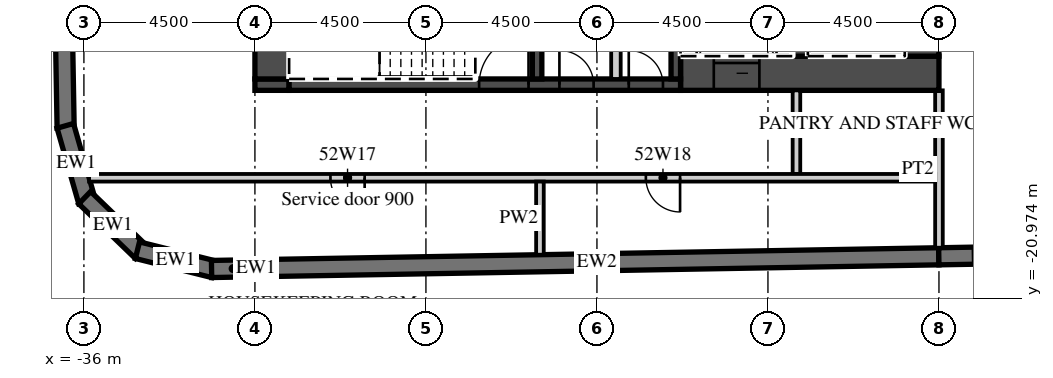
"""IFC4 building model, lengths in metres.
Left out: names, types, materials, properties, quantities, classifications, styles, units other than length and angle.
Written with IfcOpenShell. Run it as: python <this file> out.ifc"""

import sys

from ifc_helpers import new_model, si_unit, direction, frame, frame_2d, origin, place, context, subcontext, project, spatial, polyline, rectangle, outline, extrude, element, fill, save


model = new_model("IFC4")
c1 = context("Model", 3, precision=1e-05, world=origin(), true_north=direction((0.0, 1.0)))
c2 = subcontext(c1, "Body", "Model", "MODEL_VIEW")
j1 = project(units=[si_unit("LENGTHUNIT", "METRE"), si_unit("PLANEANGLEUNIT", "RADIAN")], contexts=[c1])
p1 = place(None, origin())
s1 = spatial("IfcSite", under=j1, at=p1, CompositionType="ELEMENT")
p2 = place(p1, origin())
s2 = spatial("IfcBuilding", under=s1, at=p2, CompositionType="ELEMENT")
p3 = place(p2, frame((0.0, 0.0, 217.7)))
s3 = spatial("IfcBuildingStorey", under=s2, at=p3, CompositionType="ELEMENT", Elevation=217.7)
p4 = place(p3, frame((-37.057, 16.503, 0.0), z_axis=(0.0, 0.0, 1.0), x_axis=(0.017452279857, -0.999847697366, 0.0)))
e1 = element("IfcWall", 1, at=p4, inside=s3, PredefinedType="SOLIDWALL", context=c2, shape_type="SweptSolid", body=[
    extrude(rectangle(XDim=33.0, YDim=0.45, at=frame_2d((16.5, 0.0))), origin(), (0.0, 0.0, 1.0), 3.02),
])
p5 = place(p3, frame((-36.49, -16.434, 0.0), z_axis=(0.0, 0.0, 1.0), x_axis=(0.275577603096, -0.961278827745, 0.0)))
e2 = element("IfcWall", 2, at=p5, inside=s3, PredefinedType="SOLIDWALL", context=c2, shape_type="SweptSolid", body=[
    extrude(outline(polyline([(0.0, -0.225), (2.071, -0.225), (1.95, 0.225), (0.121, 0.225), (0.0, -0.225)])), origin(), (0.0, 0.0, 1.0), 3.02),
])
p6 = place(p3, frame((-35.979, -18.324, 0.0), z_axis=(0.0, 0.0, 1.0), x_axis=(0.719320193998, -0.694678672846, 0.0)))
e3 = element("IfcWall", 3, at=p6, inside=s3, PredefinedType="SOLIDWALL", context=c2, shape_type="SweptSolid", body=[
    extrude(outline(polyline([(0.0, -0.225), (2.071, -0.225), (1.95, 0.225), (0.121, 0.225), (0.0, -0.225)])), origin(), (0.0, 0.0, 1.0), 3.02),
])
p7 = place(p3, frame((-34.591, -19.706, 0.0), z_axis=(0.0, 0.0, 1.0), x_axis=(0.970315655375, -0.241841950319, 0.0)))
e4 = element("IfcWall", 4, at=p7, inside=s3, PredefinedType="SOLIDWALL", context=c2, shape_type="SweptSolid", body=[
    extrude(outline(polyline([(0.0, -0.225), (2.071, -0.225), (1.95, 0.225), (0.121, 0.225), (0.0, -0.225)])), origin(), (0.0, 0.0, 1.0), 3.02),
])
p8 = place(p3, frame((-32.641, -20.2, 0.0), z_axis=(0.0, 0.0, 1.0), x_axis=(0.99984870815, 0.017394275206, 0.0)))
e5 = element("IfcWall", 5, at=p8, inside=s3, PredefinedType="SOLIDWALL", context=c2, shape_type="SweptSolid", body=[
    extrude(rectangle(XDim=1.137, YDim=0.45, at=frame_2d((0.568, 0.0))), origin(), (0.0, 0.0, 1.0), 3.02),
])
p9 = place(p3, frame((-31.504, -20.18, 0.0), z_axis=(0.0, 0.0, 1.0), x_axis=(0.999847677887, 0.017453395744, 0.0)))
e6 = element("IfcWall", 6, at=p9, inside=s3, PredefinedType="SOLIDWALL", context=c2, shape_type="SweptSolid", body=[
    extrude(rectangle(XDim=18.003, YDim=0.45, at=frame_2d((9.001, 0.0))), origin(), (0.0, 0.0, 1.0), 3.02),
])
p10 = place(p3, frame((-13.504, -19.866, 0.0), z_axis=(0.0, 0.0, 1.0), x_axis=(0.999847672978, 0.017453676992, 0.0)))
e7 = element("IfcWall", 7, at=p10, inside=s3, PredefinedType="SOLIDWALL", context=c2, shape_type="SweptSolid", body=[
    extrude(rectangle(XDim=52.86, YDim=0.45, at=frame_2d((26.43, 0.0))), origin(), (0.0, 0.0, 1.0), 3.02),
])
p11 = place(p10, frame((0.9, 0.0, 0.45)))
e8 = element("IfcOpeningElement", 8, at=p11, cuts=e7, PredefinedType="OPENING", context=c2, shape_type="SweptSolid", body=[
    extrude(rectangle(XDim=2.7, YDim=2.25, at=frame_2d((1.35, 1.125))), frame((0.0, 0.235, 0.0), z_axis=(0.0, -1.0, 0.0), x_axis=(1.0, 0.0, 0.0)), (0.0, 0.0, 1.0), 0.47),
])
p12 = place(p10, frame((5.401, 0.0, 0.45)))
e9 = element("IfcOpeningElement", 9, at=p12, cuts=e7, PredefinedType="OPENING", context=c2, shape_type="SweptSolid", body=[
    extrude(rectangle(XDim=2.7, YDim=2.25, at=frame_2d((1.35, 1.125))), frame((0.0, 0.235, 0.0), z_axis=(0.0, -1.0, 0.0), x_axis=(1.0, 0.0, 0.0)), (0.0, 0.0, 1.0), 0.47),
])
p13 = place(p10, frame((9.902, 0.0, 0.45)))
e10 = element("IfcOpeningElement", 10, at=p13, cuts=e7, PredefinedType="OPENING", context=c2, shape_type="SweptSolid", body=[
    extrude(rectangle(XDim=2.7, YDim=2.25, at=frame_2d((1.35, 1.125))), frame((0.0, 0.235, 0.0), z_axis=(0.0, -1.0, 0.0), x_axis=(1.0, 0.0, 0.0)), (0.0, 0.0, 1.0), 0.47),
])
p14 = place(p10, frame((14.402, 0.0, 0.45)))
e11 = element("IfcOpeningElement", 11, at=p14, cuts=e7, PredefinedType="OPENING", context=c2, shape_type="SweptSolid", body=[
    extrude(rectangle(XDim=2.7, YDim=2.25, at=frame_2d((1.35, 1.125))), frame((0.0, 0.235, 0.0), z_axis=(0.0, -1.0, 0.0), x_axis=(1.0, 0.0, 0.0)), (0.0, 0.0, 1.0), 0.47),
])
p15 = place(p10, frame((18.903, 0.0, 0.45)))
e12 = element("IfcOpeningElement", 12, at=p15, cuts=e7, PredefinedType="OPENING", context=c2, shape_type="SweptSolid", body=[
    extrude(rectangle(XDim=2.7, YDim=2.25, at=frame_2d((1.35, 1.125))), frame((0.0, 0.235, 0.0), z_axis=(0.0, -1.0, 0.0), x_axis=(1.0, 0.0, 0.0)), (0.0, 0.0, 1.0), 0.47),
])
p16 = place(p10, frame((23.404, 0.0, 0.45)))
e13 = element("IfcOpeningElement", 13, at=p16, cuts=e7, PredefinedType="OPENING", context=c2, shape_type="SweptSolid", body=[
    extrude(rectangle(XDim=2.7, YDim=2.25, at=frame_2d((1.35, 1.125))), frame((0.0, 0.235, 0.0), z_axis=(0.0, -1.0, 0.0), x_axis=(1.0, 0.0, 0.0)), (0.0, 0.0, 1.0), 0.47),
])
p17 = place(p10, frame((27.904, 0.0, 0.45)))
e14 = element("IfcOpeningElement", 14, at=p17, cuts=e7, PredefinedType="OPENING", context=c2, shape_type="SweptSolid", body=[
    extrude(rectangle(XDim=2.7, YDim=2.25, at=frame_2d((1.35, 1.125))), frame((0.0, 0.235, 0.0), z_axis=(0.0, -1.0, 0.0), x_axis=(1.0, 0.0, 0.0)), (0.0, 0.0, 1.0), 0.47),
])
p18 = place(p10, frame((32.405, 0.0, 0.45)))
e15 = element("IfcOpeningElement", 15, at=p18, cuts=e7, PredefinedType="OPENING", context=c2, shape_type="SweptSolid", body=[
    extrude(rectangle(XDim=2.7, YDim=2.25, at=frame_2d((1.35, 1.125))), frame((0.0, 0.235, 0.0), z_axis=(0.0, -1.0, 0.0), x_axis=(1.0, 0.0, 0.0)), (0.0, 0.0, 1.0), 0.47),
])
p19 = place(p10, frame((36.906, 0.0, 0.45)))
e16 = element("IfcOpeningElement", 16, at=p19, cuts=e7, PredefinedType="OPENING", context=c2, shape_type="SweptSolid", body=[
    extrude(rectangle(XDim=2.7, YDim=2.25, at=frame_2d((1.35, 1.125))), frame((0.0, 0.235, 0.0), z_axis=(0.0, -1.0, 0.0), x_axis=(1.0, 0.0, 0.0)), (0.0, 0.0, 1.0), 0.47),
])
p20 = place(p10, frame((41.406, 0.0, 0.45)))
e17 = element("IfcOpeningElement", 17, at=p20, cuts=e7, PredefinedType="OPENING", context=c2, shape_type="SweptSolid", body=[
    extrude(rectangle(XDim=2.7, YDim=2.25, at=frame_2d((1.35, 1.125))), frame((0.0, 0.235, 0.0), z_axis=(0.0, -1.0, 0.0), x_axis=(1.0, 0.0, 0.0)), (0.0, 0.0, 1.0), 0.47),
])
p21 = place(p10, frame((45.907, 0.0, 0.45)))
e18 = element("IfcOpeningElement", 18, at=p21, cuts=e7, PredefinedType="OPENING", context=c2, shape_type="SweptSolid", body=[
    extrude(rectangle(XDim=2.7, YDim=2.25, at=frame_2d((1.35, 1.125))), frame((0.0, 0.235, 0.0), z_axis=(0.0, -1.0, 0.0), x_axis=(1.0, 0.0, 0.0)), (0.0, 0.0, 1.0), 0.47),
])
p22 = place(p3, frame((-13.5, -19.641, 0.0), z_axis=(0.0, 0.0, 1.0), x_axis=(0.0, 1.0, 0.0)))
e19 = element("IfcWall", 19, at=p22, inside=s3, PredefinedType="PARTITIONING", context=c2, shape_type="SweptSolid", body=[
    extrude(rectangle(XDim=4.141, YDim=0.2, at=frame_2d((2.071, 0.0))), origin(), (0.0, 0.0, 1.0), 3.02),
])
p23 = place(p3, frame((-20.3, -15.05, 0.0), z_axis=(0.0, 0.0, 1.0), x_axis=(1.0, 0.0, 0.0)))
e20 = element("IfcWall", 20, at=p23, inside=s3, PredefinedType="SHEAR", context=c2, shape_type="SweptSolid", body=[
    extrude(rectangle(XDim=6.8, YDim=0.9, at=frame_2d((3.4, 0.0))), origin(), (0.0, 0.0, 1.0), 3.02),
])
p24 = place(p23, frame((0.875, 0.0, 0.0)))
e21 = element("IfcOpeningElement", 21, at=p24, cuts=e20, PredefinedType="OPENING", context=c2, shape_type="SweptSolid", body=[
    extrude(rectangle(XDim=1.2, YDim=2.1, at=frame_2d((0.6, 1.05))), frame((0.0, 0.46, 0.0), z_axis=(0.0, -1.0, 0.0), x_axis=(1.0, 0.0, 0.0)), (0.0, 0.0, 1.0), 0.92),
])
p25 = place(p3, frame((-31.5, -15.35, 0.0), z_axis=(0.0, 0.0, 1.0), x_axis=(1.0, 0.0, 0.0)))
e22 = element("IfcWall", 22, at=p25, inside=s3, PredefinedType="SHEAR", context=c2, shape_type="SweptSolid", body=[
    extrude(rectangle(XDim=0.9, YDim=0.3, at=frame_2d((0.45, 0.0))), origin(), (0.0, 0.0, 1.0), 3.02),
])
p26 = place(p3, frame((-30.6, -15.35, 0.0), z_axis=(0.0, 0.0, 1.0), x_axis=(1.0, 0.0, 0.0)))
e23 = element("IfcWall", 23, at=p26, inside=s3, PredefinedType="SHEAR", context=c2, shape_type="SweptSolid", body=[
    extrude(rectangle(XDim=10.3, YDim=0.3, at=frame_2d((5.15, 0.0))), origin(), (0.0, 0.0, 1.0), 3.02),
])
p27 = place(p26, frame((5.0, 0.0, 0.0)))
e24 = element("IfcOpeningElement", 24, at=p27, cuts=e23, PredefinedType="OPENING", context=c2, shape_type="SweptSolid", body=[
    extrude(rectangle(XDim=1.3, YDim=2.1, at=frame_2d((0.65, 1.05))), frame((0.0, 0.16, 0.0), z_axis=(0.0, -1.0, 0.0), x_axis=(1.0, 0.0, 0.0)), (0.0, 0.0, 1.0), 0.32),
])
p28 = place(p26, frame((7.113, 0.0, 0.0)))
e25 = element("IfcOpeningElement", 25, at=p28, cuts=e23, PredefinedType="OPENING", context=c2, shape_type="SweptSolid", body=[
    extrude(rectangle(XDim=0.9, YDim=2.1, at=frame_2d((0.45, 1.05))), frame((0.0, 0.16, 0.0), z_axis=(0.0, -1.0, 0.0), x_axis=(1.0, 0.0, 0.0)), (0.0, 0.0, 1.0), 0.32),
])
p29 = place(p26, frame((8.938, 0.0, 0.0)))
e26 = element("IfcOpeningElement", 26, at=p29, cuts=e23, PredefinedType="OPENING", context=c2, shape_type="SweptSolid", body=[
    extrude(rectangle(XDim=0.9, YDim=2.1, at=frame_2d((0.45, 1.05))), frame((0.0, 0.16, 0.0), z_axis=(0.0, -1.0, 0.0), x_axis=(1.0, 0.0, 0.0)), (0.0, 0.0, 1.0), 0.32),
])
p30 = place(p3, frame((-31.05, -15.2, 0.0), z_axis=(0.0, 0.0, 1.0), x_axis=(0.0, 1.0, 0.0)))
e27 = element("IfcWall", 27, at=p30, inside=s3, PredefinedType="SHEAR", context=c2, shape_type="SweptSolid", body=[
    extrude(rectangle(XDim=12.8, YDim=0.9, at=frame_2d((6.4, 0.0))), origin(), (0.0, 0.0, 1.0), 3.02),
])
p31 = place(p30, frame((11.5, 0.0, 0.0)))
e28 = element("IfcOpeningElement", 28, at=p31, cuts=e27, PredefinedType="OPENING", context=c2, shape_type="SweptSolid", body=[
    extrude(rectangle(XDim=1.1, YDim=2.1, at=frame_2d((0.55, 1.05))), frame((0.0, 0.46, 0.0), z_axis=(0.0, -1.0, 0.0), x_axis=(1.0, 0.0, 0.0)), (0.0, 0.0, 1.0), 0.92),
])
p32 = place(p3, frame((-13.95, -14.6, 0.0), z_axis=(0.0, 0.0, 1.0), x_axis=(0.0, 1.0, 0.0)))
e29 = element("IfcWall", 29, at=p32, inside=s3, PredefinedType="SHEAR", context=c2, shape_type="SweptSolid", body=[
    extrude(rectangle(XDim=12.2, YDim=0.9, at=frame_2d((6.1, 0.0))), origin(), (0.0, 0.0, 1.0), 3.02),
])
p33 = place(p3, frame((-17.15, -14.6, 0.0), z_axis=(0.0, 0.0, 1.0), x_axis=(0.0, 1.0, 0.0)))
e30 = element("IfcWall", 30, at=p33, inside=s3, PredefinedType="SHEAR", context=c2, shape_type="SweptSolid", body=[
    extrude(rectangle(XDim=5.8, YDim=0.4, at=frame_2d((2.9, 0.0))), origin(), (0.0, 0.0, 1.0), 3.02),
])
for number, where, z_axis, x_axis in (
    (31, (-20.425, -15.2, 0.0), (0.0, 0.0, 1.0), (0.0, 1.0, 0.0)),
    (32, (-24.075, -15.2, 0.0), (0.0, 0.0, 1.0), (0.0, 1.0, 0.0)),
):
    element("IfcWall", number, at=place(p3, frame(where, z_axis=z_axis, x_axis=x_axis)), inside=s3, PredefinedType="SHEAR", context=c2, shape_type="SweptSolid", body=[
        extrude(rectangle(XDim=3.25, YDim=0.25, at=frame_2d((1.625, 0.0))), origin(), (0.0, 0.0, 1.0), 3.02),
    ])
p34 = place(p3, frame((-22.0, -15.2, 0.0), z_axis=(0.0, 0.0, 1.0), x_axis=(0.0, 1.0, 0.0)))
e33 = element("IfcWall", 33, at=p34, inside=s3, PredefinedType="PARTITIONING", context=c2, shape_type="SweptSolid", body=[
    extrude(rectangle(XDim=3.25, YDim=0.25, at=frame_2d((1.625, 0.0))), origin(), (0.0, 0.0, 1.0), 3.02),
])
p35 = place(p3, frame((-17.25, -17.7, 0.0), z_axis=(0.0, 0.0, 1.0), x_axis=(0.0, 1.0, 0.0)))
e34 = element("IfcWall", 34, at=p35, inside=s3, PredefinedType="PARTITIONING", context=c2, shape_type="SweptSolid", body=[
    extrude(rectangle(XDim=2.2, YDim=0.2, at=frame_2d((1.1, 0.0))), origin(), (0.0, 0.0, 1.0), 3.02),
])
p36 = place(p3, frame((-35.864, -17.8, 0.0), z_axis=(0.0, 0.0, 1.0), x_axis=(1.0, 0.0, 0.0)))
e35 = element("IfcWall", 35, at=p36, inside=s3, PredefinedType="PARTITIONING", context=c2, shape_type="SweptSolid", body=[
    extrude(rectangle(XDim=22.264, YDim=0.2, at=frame_2d((11.132, 0.0))), origin(), (0.0, 0.0, 1.0), 3.02),
])
p37 = place(p36, frame((6.351, 0.0, 0.0)))
e36 = element("IfcOpeningElement", 36, at=p37, cuts=e35, PredefinedType="OPENING", context=c2, shape_type="SweptSolid", body=[
    extrude(rectangle(XDim=0.9, YDim=2.1, at=frame_2d((0.45, 1.05))), frame((0.0, 0.11, 0.0), z_axis=(0.0, -1.0, 0.0), x_axis=(1.0, 0.0, 0.0)), (0.0, 0.0, 1.0), 0.22),
])
p38 = place(p36, frame((14.651, 0.0, 0.0)))
e37 = element("IfcOpeningElement", 37, at=p38, cuts=e35, PredefinedType="OPENING", context=c2, shape_type="SweptSolid", body=[
    extrude(rectangle(XDim=0.9, YDim=2.1, at=frame_2d((0.45, 1.05))), frame((0.0, 0.11, 0.0), z_axis=(0.0, -1.0, 0.0), x_axis=(1.0, 0.0, 0.0)), (0.0, 0.0, 1.0), 0.22),
])
p39 = place(p3, frame((-24.0, -19.824, 0.0), z_axis=(0.0, 0.0, 1.0), x_axis=(0.0, 1.0, 0.0)))
e38 = element("IfcWall", 38, at=p39, inside=s3, PredefinedType="PARTITIONING", context=c2, shape_type="SweptSolid", body=[
    extrude(rectangle(XDim=1.925, YDim=0.2, at=frame_2d((0.962, 0.0))), origin(), (0.0, 0.0, 1.0), 3.02),
])
p40 = place(p11, origin())
e39 = element("IfcWindow", 39, at=p40, inside=s3, PartitioningType="SINGLE_PANEL", PredefinedType="WINDOW", context=c2, shape_type="SweptSolid", body=[
    extrude(rectangle(XDim=2.7, YDim=2.25, at=frame_2d((1.35, 1.125))), frame((0.0, 0.09, 0.0), z_axis=(0.0, -1.0, 0.0), x_axis=(1.0, 0.0, 0.0)), (0.0, 0.0, 1.0), 0.06),
])
fill(e8, e39)
p41 = place(p24, origin())
e40 = element("IfcDoor", 40, at=p41, inside=s3, OperationType="SLIDING_TO_LEFT", PredefinedType="DOOR", context=c2, shape_type="SweptSolid", body=[
    extrude(rectangle(XDim=1.2, YDim=2.1, at=frame_2d((0.6, 1.05))), frame((0.0, 0.025, 0.0), z_axis=(0.0, -1.0, 0.0), x_axis=(1.0, 0.0, 0.0)), (0.0, 0.0, 1.0), 0.05),
])
fill(e21, e40)
p42 = place(p27, origin())
e41 = element("IfcDoor", 41, at=p42, inside=s3, OperationType="SINGLE_SWING_RIGHT", PredefinedType="DOOR", context=c2, shape_type="SweptSolid", body=[
    extrude(rectangle(XDim=1.3, YDim=2.1, at=frame_2d((0.65, 1.05))), frame((0.0, 0.025, 0.0), z_axis=(0.0, -1.0, 0.0), x_axis=(1.0, 0.0, 0.0)), (0.0, 0.0, 1.0), 0.05),
])
fill(e24, e41)
p43 = place(p28, origin())
e42 = element("IfcDoor", 42, at=p43, inside=s3, OperationType="SINGLE_SWING_LEFT", PredefinedType="DOOR", context=c2, shape_type="SweptSolid", body=[
    extrude(rectangle(XDim=0.9, YDim=2.1, at=frame_2d((0.45, 1.05))), frame((0.0, 0.025, 0.0), z_axis=(0.0, -1.0, 0.0), x_axis=(1.0, 0.0, 0.0)), (0.0, 0.0, 1.0), 0.05),
])
fill(e25, e42)
p44 = place(p29, origin())
e43 = element("IfcDoor", 43, at=p44, inside=s3, OperationType="SINGLE_SWING_LEFT", PredefinedType="DOOR", context=c2, shape_type="SweptSolid", body=[
    extrude(rectangle(XDim=0.9, YDim=2.1, at=frame_2d((0.45, 1.05))), frame((0.0, 0.025, 0.0), z_axis=(0.0, -1.0, 0.0), x_axis=(1.0, 0.0, 0.0)), (0.0, 0.0, 1.0), 0.05),
])
fill(e26, e43)
p45 = place(p37, origin())
e44 = element("IfcDoor", 44, at=p45, inside=s3, OperationType="SINGLE_SWING_RIGHT", PredefinedType="DOOR", context=c2, shape_type="SweptSolid", body=[
    extrude(rectangle(XDim=0.9, YDim=2.1, at=frame_2d((0.45, 1.05))), frame((0.0, 0.025, 0.0), z_axis=(0.0, -1.0, 0.0), x_axis=(1.0, 0.0, 0.0)), (0.0, 0.0, 1.0), 0.05),
])
fill(e36, e44)
p46 = place(p38, origin())
e45 = element("IfcDoor", 45, at=p46, inside=s3, OperationType="SINGLE_SWING_RIGHT", PredefinedType="DOOR", context=c2, shape_type="SweptSolid", body=[
    extrude(rectangle(XDim=0.9, YDim=2.1, at=frame_2d((0.45, 1.05))), frame((0.0, 0.025, 0.0), z_axis=(0.0, -1.0, 0.0), x_axis=(1.0, 0.0, 0.0)), (0.0, 0.0, 1.0), 0.05),
])
fill(e37, e45)
save(model, sys.argv[1])
